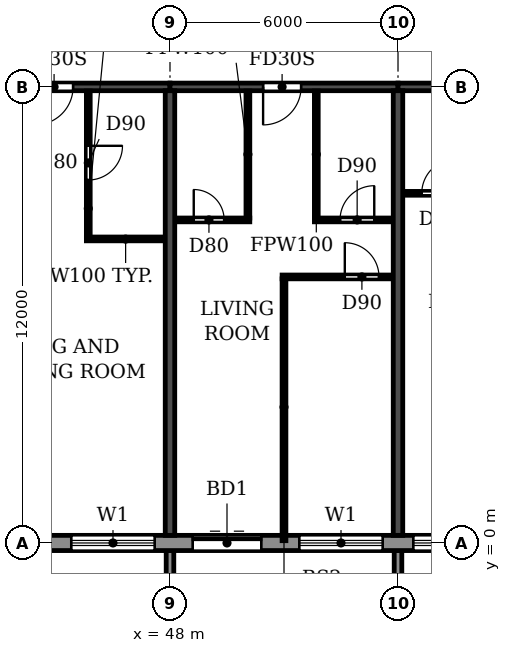
"""IFC4 building model, lengths in metres.
Left out: names, types, materials, properties, quantities, classifications, styles, units other than length and angle.
Written with IfcOpenShell. Run it as: python <this file> out.ifc"""

import sys

from ifc_helpers import new_model, si_unit, direction, frame, frame_2d, origin, place, context, subcontext, project, spatial, polyline, rectangle, outline, extrude, source, transform, mapped, element, fill, save


model = new_model("IFC4")
c1 = context("Model", 3, precision=1e-05, world=origin(), true_north=direction((0.0, 1.0)))
c2 = subcontext(c1, "Body", "Model", "MODEL_VIEW")
j1 = project(units=[si_unit("LENGTHUNIT", "METRE"), si_unit("PLANEANGLEUNIT", "RADIAN")], contexts=[c1])
p1 = place(None, origin())
s1 = spatial("IfcSite", under=j1, at=p1, CompositionType="ELEMENT")
p2 = place(p1, origin())
s2 = spatial("IfcBuilding", under=s1, at=p2, CompositionType="ELEMENT")
p3 = place(p2, frame((0.0, 0.0, 201.6)))
s3 = spatial("IfcBuildingStorey", under=s2, at=p3, CompositionType="ELEMENT", Elevation=201.6)
for number, where, z_axis, x_axis in (
    (1, (48.0, 0.2, 0.0), (0.0, 0.0, 1.0), (0.0, 1.0, 0.0)),
    (2, (54.0, 0.2, 0.0), (0.0, 0.0, 1.0), (0.0, 1.0, 0.0)),
):
    element("IfcWall", number, at=place(p3, frame(where, z_axis=z_axis, x_axis=x_axis)), inside=s3, PredefinedType="SHEAR", context=c2, shape_type="SweptSolid", body=[
        extrude(rectangle(XDim=11.7, YDim=0.25, at=frame_2d((5.85, 0.0))), origin(), (0.0, 0.0, 1.0), 3.08),
    ])
p4 = place(p3, frame((42.0, 12.0, 0.0), z_axis=(0.0, 0.0, 1.0), x_axis=(1.0, 0.0, 0.0)))
e3 = element("IfcWall", 3, at=p4, inside=s3, PredefinedType="SHEAR", context=c2, shape_type="SweptSolid", body=[
    extrude(rectangle(XDim=6.0, YDim=0.2, at=frame_2d((3.0, 0.0))), origin(), (0.0, 0.0, 1.0), 2.48),
])
p5 = place(p4, frame((2.45, 0.0, 0.0)))
e4 = element("IfcOpeningElement", 4, at=p5, cuts=e3, PredefinedType="OPENING", context=c2, shape_type="SweptSolid", body=[
    extrude(rectangle(XDim=1.0, YDim=2.1, at=frame_2d((0.5, 1.05))), frame((0.0, 0.11, 0.0), z_axis=(0.0, -1.0, 0.0), x_axis=(1.0, 0.0, 0.0)), (0.0, 0.0, 1.0), 0.22),
])
p6 = place(p3, frame((48.0, 12.0, 0.0), z_axis=(0.0, 0.0, 1.0), x_axis=(1.0, 0.0, 0.0)))
e5 = element("IfcWall", 5, at=p6, inside=s3, PredefinedType="SHEAR", context=c2, shape_type="SweptSolid", body=[
    extrude(rectangle(XDim=6.0, YDim=0.2, at=frame_2d((3.0, 0.0))), origin(), (0.0, 0.0, 1.0), 2.48),
])
p7 = place(p6, frame((2.45, 0.0, 0.0)))
e6 = element("IfcOpeningElement", 6, at=p7, cuts=e5, PredefinedType="OPENING", context=c2, shape_type="SweptSolid", body=[
    extrude(rectangle(XDim=1.0, YDim=2.1, at=frame_2d((0.5, 1.05))), frame((0.0, 0.11, 0.0), z_axis=(0.0, -1.0, 0.0), x_axis=(1.0, 0.0, 0.0)), (0.0, 0.0, 1.0), 0.22),
])
p8 = place(p3, frame((54.0, 12.0, 0.0), z_axis=(0.0, 0.0, 1.0), x_axis=(1.0, 0.0, 0.0)))
e7 = element("IfcWall", 7, at=p8, inside=s3, PredefinedType="SHEAR", context=c2, shape_type="SweptSolid", body=[
    extrude(rectangle(XDim=6.0, YDim=0.2, at=frame_2d((3.0, 0.0))), origin(), (0.0, 0.0, 1.0), 2.48),
])
p9 = place(p8, frame((2.55, 0.0, 0.0)))
e8 = element("IfcOpeningElement", 8, at=p9, cuts=e7, PredefinedType="OPENING", context=c2, shape_type="SweptSolid", body=[
    extrude(rectangle(XDim=1.0, YDim=2.1, at=frame_2d((0.5, 1.05))), frame((0.0, 0.11, 0.0), z_axis=(0.0, -1.0, 0.0), x_axis=(1.0, 0.0, 0.0)), (0.0, 0.0, 1.0), 0.22),
])
p10 = place(p3, frame((22.683, 0.0, 0.0), z_axis=(0.0, 0.0, 1.0), x_axis=(1.0, 0.0, 0.0)))
e9 = element("IfcWall", 9, at=p10, inside=s3, PredefinedType="STANDARD", context=c2, shape_type="SweptSolid", body=[
    extrude(rectangle(XDim=56.634, YDim=0.4, at=frame_2d((28.317, 0.0))), origin(), (0.0, 0.0, 1.0), 3.08),
])
p11 = place(p10, frame((1.917, 0.0, 0.0)))
e10 = element("IfcOpeningElement", 10, at=p11, cuts=e9, PredefinedType="OPENING", context=c2, shape_type="SweptSolid", body=[
    extrude(rectangle(XDim=1.8, YDim=2.4, at=frame_2d((0.9, 1.2))), frame((0.0, 0.21, 0.0), z_axis=(0.0, -1.0, 0.0), x_axis=(1.0, 0.0, 0.0)), (0.0, 0.0, 1.0), 0.42),
])
p12 = place(p10, frame((4.717, 0.0, 0.9)))
e11 = element("IfcOpeningElement", 11, at=p12, cuts=e9, PredefinedType="OPENING", context=c2, shape_type="SweptSolid", body=[
    extrude(rectangle(XDim=2.2, YDim=1.5, at=frame_2d((1.1, 0.75))), frame((0.0, 0.21, 0.0), z_axis=(0.0, -1.0, 0.0), x_axis=(1.0, 0.0, 0.0)), (0.0, 0.0, 1.0), 0.42),
])
p13 = place(p10, frame((7.717, 0.0, 0.9)))
e12 = element("IfcOpeningElement", 12, at=p13, cuts=e9, PredefinedType="OPENING", context=c2, shape_type="SweptSolid", body=[
    extrude(rectangle(XDim=2.2, YDim=1.5, at=frame_2d((1.1, 0.75))), frame((0.0, 0.21, 0.0), z_axis=(0.0, -1.0, 0.0), x_axis=(1.0, 0.0, 0.0)), (0.0, 0.0, 1.0), 0.42),
])
p14 = place(p10, frame((10.717, 0.0, 0.9)))
e13 = element("IfcOpeningElement", 13, at=p14, cuts=e9, PredefinedType="OPENING", context=c2, shape_type="SweptSolid", body=[
    extrude(rectangle(XDim=2.2, YDim=1.5, at=frame_2d((1.1, 0.75))), frame((0.0, 0.21, 0.0), z_axis=(0.0, -1.0, 0.0), x_axis=(1.0, 0.0, 0.0)), (0.0, 0.0, 1.0), 0.42),
])
p15 = place(p10, frame((13.917, 0.0, 0.0)))
e14 = element("IfcOpeningElement", 14, at=p15, cuts=e9, PredefinedType="OPENING", context=c2, shape_type="SweptSolid", body=[
    extrude(rectangle(XDim=1.8, YDim=2.4, at=frame_2d((0.9, 1.2))), frame((0.0, 0.21, 0.0), z_axis=(0.0, -1.0, 0.0), x_axis=(1.0, 0.0, 0.0)), (0.0, 0.0, 1.0), 0.42),
])
p16 = place(p10, frame((16.717, 0.0, 0.9)))
e15 = element("IfcOpeningElement", 15, at=p16, cuts=e9, PredefinedType="OPENING", context=c2, shape_type="SweptSolid", body=[
    extrude(rectangle(XDim=2.2, YDim=1.5, at=frame_2d((1.1, 0.75))), frame((0.0, 0.21, 0.0), z_axis=(0.0, -1.0, 0.0), x_axis=(1.0, 0.0, 0.0)), (0.0, 0.0, 1.0), 0.42),
])
p17 = place(p10, frame((19.717, 0.0, 0.9)))
e16 = element("IfcOpeningElement", 16, at=p17, cuts=e9, PredefinedType="OPENING", context=c2, shape_type="SweptSolid", body=[
    extrude(rectangle(XDim=2.2, YDim=1.5, at=frame_2d((1.1, 0.75))), frame((0.0, 0.21, 0.0), z_axis=(0.0, -1.0, 0.0), x_axis=(1.0, 0.0, 0.0)), (0.0, 0.0, 1.0), 0.42),
])
p18 = place(p10, frame((22.717, 0.0, 0.9)))
e17 = element("IfcOpeningElement", 17, at=p18, cuts=e9, PredefinedType="OPENING", context=c2, shape_type="SweptSolid", body=[
    extrude(rectangle(XDim=2.2, YDim=1.5, at=frame_2d((1.1, 0.75))), frame((0.0, 0.21, 0.0), z_axis=(0.0, -1.0, 0.0), x_axis=(1.0, 0.0, 0.0)), (0.0, 0.0, 1.0), 0.42),
])
p19 = place(p10, frame((25.917, 0.0, 0.0)))
e18 = element("IfcOpeningElement", 18, at=p19, cuts=e9, PredefinedType="OPENING", context=c2, shape_type="SweptSolid", body=[
    extrude(rectangle(XDim=1.8, YDim=2.4, at=frame_2d((0.9, 1.2))), frame((0.0, 0.21, 0.0), z_axis=(0.0, -1.0, 0.0), x_axis=(1.0, 0.0, 0.0)), (0.0, 0.0, 1.0), 0.42),
])
p20 = place(p10, frame((28.717, 0.0, 0.9)))
e19 = element("IfcOpeningElement", 19, at=p20, cuts=e9, PredefinedType="OPENING", context=c2, shape_type="SweptSolid", body=[
    extrude(rectangle(XDim=2.2, YDim=1.5, at=frame_2d((1.1, 0.75))), frame((0.0, 0.21, 0.0), z_axis=(0.0, -1.0, 0.0), x_axis=(1.0, 0.0, 0.0)), (0.0, 0.0, 1.0), 0.42),
])
p21 = place(p10, frame((31.717, 0.0, 0.9)))
e20 = element("IfcOpeningElement", 20, at=p21, cuts=e9, PredefinedType="OPENING", context=c2, shape_type="SweptSolid", body=[
    extrude(rectangle(XDim=2.2, YDim=1.5, at=frame_2d((1.1, 0.75))), frame((0.0, 0.21, 0.0), z_axis=(0.0, -1.0, 0.0), x_axis=(1.0, 0.0, 0.0)), (0.0, 0.0, 1.0), 0.42),
])
p22 = place(p10, frame((34.717, 0.0, 0.9)))
e21 = element("IfcOpeningElement", 21, at=p22, cuts=e9, PredefinedType="OPENING", context=c2, shape_type="SweptSolid", body=[
    extrude(rectangle(XDim=2.2, YDim=1.5, at=frame_2d((1.1, 0.75))), frame((0.0, 0.21, 0.0), z_axis=(0.0, -1.0, 0.0), x_axis=(1.0, 0.0, 0.0)), (0.0, 0.0, 1.0), 0.42),
])
p23 = place(p10, frame((37.717, 0.0, 0.9)))
e22 = element("IfcOpeningElement", 22, at=p23, cuts=e9, PredefinedType="OPENING", context=c2, shape_type="SweptSolid", body=[
    extrude(rectangle(XDim=2.2, YDim=1.5, at=frame_2d((1.1, 0.75))), frame((0.0, 0.21, 0.0), z_axis=(0.0, -1.0, 0.0), x_axis=(1.0, 0.0, 0.0)), (0.0, 0.0, 1.0), 0.42),
])
p24 = place(p10, frame((40.717, 0.0, 0.9)))
e23 = element("IfcOpeningElement", 23, at=p24, cuts=e9, PredefinedType="OPENING", context=c2, shape_type="SweptSolid", body=[
    extrude(rectangle(XDim=2.2, YDim=1.5, at=frame_2d((1.1, 0.75))), frame((0.0, 0.21, 0.0), z_axis=(0.0, -1.0, 0.0), x_axis=(1.0, 0.0, 0.0)), (0.0, 0.0, 1.0), 0.42),
])
p25 = place(p10, frame((43.717, 0.0, 0.9)))
e24 = element("IfcOpeningElement", 24, at=p25, cuts=e9, PredefinedType="OPENING", context=c2, shape_type="SweptSolid", body=[
    extrude(rectangle(XDim=2.2, YDim=1.5, at=frame_2d((1.1, 0.75))), frame((0.0, 0.21, 0.0), z_axis=(0.0, -1.0, 0.0), x_axis=(1.0, 0.0, 0.0)), (0.0, 0.0, 1.0), 0.42),
])
p26 = place(p10, frame((46.717, 0.0, 0.9)))
e25 = element("IfcOpeningElement", 25, at=p26, cuts=e9, PredefinedType="OPENING", context=c2, shape_type="SweptSolid", body=[
    extrude(rectangle(XDim=2.2, YDim=1.5, at=frame_2d((1.1, 0.75))), frame((0.0, 0.21, 0.0), z_axis=(0.0, -1.0, 0.0), x_axis=(1.0, 0.0, 0.0)), (0.0, 0.0, 1.0), 0.42),
])
p27 = place(p10, frame((49.717, 0.0, 0.9)))
e26 = element("IfcOpeningElement", 26, at=p27, cuts=e9, PredefinedType="OPENING", context=c2, shape_type="SweptSolid", body=[
    extrude(rectangle(XDim=2.2, YDim=1.5, at=frame_2d((1.1, 0.75))), frame((0.0, 0.21, 0.0), z_axis=(0.0, -1.0, 0.0), x_axis=(1.0, 0.0, 0.0)), (0.0, 0.0, 1.0), 0.42),
])
p28 = place(p10, frame((52.917, 0.0, 0.0)))
e27 = element("IfcOpeningElement", 27, at=p28, cuts=e9, PredefinedType="OPENING", context=c2, shape_type="SweptSolid", body=[
    extrude(rectangle(XDim=1.8, YDim=2.4, at=frame_2d((0.9, 1.2))), frame((0.0, 0.21, 0.0), z_axis=(0.0, -1.0, 0.0), x_axis=(1.0, 0.0, 0.0)), (0.0, 0.0, 1.0), 0.42),
])
m1 = source(origin(), c2, "Body", "SweptSolid", [
    extrude(outline(polyline([(0.0, 0.0), (0.2, 0.0), (0.2, 1.65), (0.0, 1.65), (0.0, 0.0)])), origin(), (0.0, 0.0, 1.0), 3.1),
])
for number, where in (
    (28, (47.9, -1.85, 0.0)),
    (29, (53.9, -1.85, 0.0)),
):
    element("IfcWall", number, at=place(p3, frame(where)), inside=s3, PredefinedType="STANDARD", context=c2, shape_type="MappedRepresentation", body=[
        mapped(m1, transform((0.0, 0.0, 0.0))),
    ])
p29 = place(p3, frame((50.95, 7.0, 0.0), z_axis=(0.0, 0.0, 1.0), x_axis=(1.0, 0.0, 0.0)))
e30 = element("IfcWall", 30, at=p29, inside=s3, PredefinedType="PARTITIONING", context=c2, shape_type="SweptSolid", body=[
    extrude(rectangle(XDim=2.915, YDim=0.1, at=frame_2d((1.458, 0.0))), origin(), (0.0, 0.0, 1.0), 3.08),
])
p30 = place(p29, frame((1.65, 0.0, 0.0)))
e31 = element("IfcOpeningElement", 31, at=p30, cuts=e30, PredefinedType="OPENING", context=c2, shape_type="SweptSolid", body=[
    extrude(rectangle(XDim=0.9, YDim=2.1, at=frame_2d((0.45, 1.05))), frame((0.0, 0.06, 0.0), z_axis=(0.0, -1.0, 0.0), x_axis=(1.0, 0.0, 0.0)), (0.0, 0.0, 1.0), 0.12),
])
p31 = place(p3, frame((45.8, 8.0, 0.0), z_axis=(0.0, 0.0, 1.0), x_axis=(1.0, 0.0, 0.0)))
e32 = element("IfcWall", 32, at=p31, inside=s3, PredefinedType="PARTITIONING", context=c2, shape_type="SweptSolid", body=[
    extrude(rectangle(XDim=2.065, YDim=0.1, at=frame_2d((1.032, 0.0))), origin(), (0.0, 0.0, 1.0), 3.08),
])
p32 = place(p3, frame((48.135, 8.5, 0.0), z_axis=(0.0, 0.0, 1.0), x_axis=(1.0, 0.0, 0.0)))
e33 = element("IfcWall", 33, at=p32, inside=s3, PredefinedType="PARTITIONING", context=c2, shape_type="SweptSolid", body=[
    extrude(rectangle(XDim=1.965, YDim=0.1, at=frame_2d((0.982, 0.0))), origin(), (0.0, 0.0, 1.0), 3.08),
])
p33 = place(p32, frame((0.49, 0.0, 0.0)))
e34 = element("IfcOpeningElement", 34, at=p33, cuts=e33, PredefinedType="OPENING", context=c2, shape_type="SweptSolid", body=[
    extrude(rectangle(XDim=0.8, YDim=2.1, at=frame_2d((0.4, 1.05))), frame((0.0, 0.06, 0.0), z_axis=(0.0, -1.0, 0.0), x_axis=(1.0, 0.0, 0.0)), (0.0, 0.0, 1.0), 0.12),
])
p34 = place(p3, frame((51.8, 8.5, 0.0), z_axis=(0.0, 0.0, 1.0), x_axis=(1.0, 0.0, 0.0)))
e35 = element("IfcWall", 35, at=p34, inside=s3, PredefinedType="PARTITIONING", context=c2, shape_type="SweptSolid", body=[
    extrude(rectangle(XDim=2.065, YDim=0.1, at=frame_2d((1.032, 0.0))), origin(), (0.0, 0.0, 1.0), 3.08),
])
p35 = place(p34, frame((0.675, 0.0, 0.0)))
e36 = element("IfcOpeningElement", 36, at=p35, cuts=e35, PredefinedType="OPENING", context=c2, shape_type="SweptSolid", body=[
    extrude(rectangle(XDim=0.9, YDim=2.1, at=frame_2d((0.45, 1.05))), frame((0.0, 0.06, 0.0), z_axis=(0.0, -1.0, 0.0), x_axis=(1.0, 0.0, 0.0)), (0.0, 0.0, 1.0), 0.12),
])
p36 = place(p3, frame((54.135, 9.2, 0.0), z_axis=(0.0, 0.0, 1.0), x_axis=(1.0, 0.0, 0.0)))
e37 = element("IfcWall", 37, at=p36, inside=s3, PredefinedType="PARTITIONING", context=c2, shape_type="SweptSolid", body=[
    extrude(rectangle(XDim=2.065, YDim=0.1, at=frame_2d((1.032, 0.0))), origin(), (0.0, 0.0, 1.0), 3.08),
])
p37 = place(p36, frame((0.49, 0.0, 0.0)))
e38 = element("IfcOpeningElement", 38, at=p37, cuts=e37, PredefinedType="OPENING", context=c2, shape_type="SweptSolid", body=[
    extrude(rectangle(XDim=0.9, YDim=2.1, at=frame_2d((0.45, 1.05))), frame((0.0, 0.06, 0.0), z_axis=(0.0, -1.0, 0.0), x_axis=(1.0, 0.0, 0.0)), (0.0, 0.0, 1.0), 0.12),
])
p38 = place(p3, frame((45.85, 8.05, 0.0), z_axis=(0.0, 0.0, 1.0), x_axis=(0.0, 1.0, 0.0)))
e39 = element("IfcWall", 39, at=p38, inside=s3, PredefinedType="PARTITIONING", context=c2, shape_type="SweptSolid", body=[
    extrude(rectangle(XDim=3.84, YDim=0.1, at=frame_2d((1.92, 0.0))), origin(), (0.0, 0.0, 1.0), 3.08),
])
p39 = place(p38, frame((1.5, 0.0, 0.0)))
e40 = element("IfcOpeningElement", 40, at=p39, cuts=e39, PredefinedType="OPENING", context=c2, shape_type="SweptSolid", body=[
    extrude(rectangle(XDim=0.9, YDim=2.1, at=frame_2d((0.45, 1.05))), frame((0.0, 0.06, 0.0), z_axis=(0.0, -1.0, 0.0), x_axis=(1.0, 0.0, 0.0)), (0.0, 0.0, 1.0), 0.12),
])
p40 = place(p3, frame((50.05, 8.55, 0.0), z_axis=(0.0, 0.0, 1.0), x_axis=(0.0, 1.0, 0.0)))
e41 = element("IfcWall", 41, at=p40, inside=s3, PredefinedType="PARTITIONING", context=c2, shape_type="SweptSolid", body=[
    extrude(rectangle(XDim=3.34, YDim=0.1, at=frame_2d((1.67, 0.0))), origin(), (0.0, 0.0, 1.0), 3.08),
])
p41 = place(p3, frame((51.0, 0.06, 0.0), z_axis=(0.0, 0.0, 1.0), x_axis=(0.0, 1.0, 0.0)))
e42 = element("IfcWall", 42, at=p41, inside=s3, PredefinedType="PARTITIONING", context=c2, shape_type="SweptSolid", body=[
    extrude(rectangle(XDim=6.89, YDim=0.1, at=frame_2d((3.445, 0.0))), origin(), (0.0, 0.0, 1.0), 3.08),
])
p42 = place(p3, frame((51.85, 8.55, 0.0), z_axis=(0.0, 0.0, 1.0), x_axis=(0.0, 1.0, 0.0)))
e43 = element("IfcWall", 43, at=p42, inside=s3, PredefinedType="PARTITIONING", context=c2, shape_type="SweptSolid", body=[
    extrude(rectangle(XDim=3.34, YDim=0.1, at=frame_2d((1.67, 0.0))), origin(), (0.0, 0.0, 1.0), 3.08),
])
p43 = place(p18, origin())
e44 = element("IfcWindow", 44, at=p43, inside=s3, PartitioningType="DOUBLE_PANEL_HORIZONTAL", PredefinedType="WINDOW", context=c2, shape_type="SweptSolid", body=[
    extrude(rectangle(XDim=2.2, YDim=1.5, at=frame_2d((1.1, 0.75))), frame((0.0, 0.03, 0.0), z_axis=(0.0, -1.0, 0.0), x_axis=(1.0, 0.0, 0.0)), (0.0, 0.0, 1.0), 0.06),
])
fill(e17, e44)
p44 = place(p19, origin())
e45 = element("IfcDoor", 45, at=p44, inside=s3, OperationType="DOUBLE_DOOR_SLIDING", PredefinedType="DOOR", context=c2, shape_type="SweptSolid", body=[
    extrude(rectangle(XDim=1.8, YDim=2.4, at=frame_2d((0.9, 1.2))), frame((0.0, 0.025, 0.0), z_axis=(0.0, -1.0, 0.0), x_axis=(1.0, 0.0, 0.0)), (0.0, 0.0, 1.0), 0.05),
])
fill(e18, e45)
p45 = place(p20, origin())
e46 = element("IfcWindow", 46, at=p45, inside=s3, PartitioningType="DOUBLE_PANEL_HORIZONTAL", PredefinedType="WINDOW", context=c2, shape_type="SweptSolid", body=[
    extrude(rectangle(XDim=2.2, YDim=1.5, at=frame_2d((1.1, 0.75))), frame((0.0, 0.03, 0.0), z_axis=(0.0, -1.0, 0.0), x_axis=(1.0, 0.0, 0.0)), (0.0, 0.0, 1.0), 0.06),
])
fill(e19, e46)
p46 = place(p21, origin())
e47 = element("IfcWindow", 47, at=p46, inside=s3, PartitioningType="DOUBLE_PANEL_HORIZONTAL", PredefinedType="WINDOW", context=c2, shape_type="SweptSolid", body=[
    extrude(rectangle(XDim=2.2, YDim=1.5, at=frame_2d((1.1, 0.75))), frame((0.0, 0.03, 0.0), z_axis=(0.0, -1.0, 0.0), x_axis=(1.0, 0.0, 0.0)), (0.0, 0.0, 1.0), 0.06),
])
fill(e20, e47)
p47 = place(p5, frame((1.0, 0.0, 0.0), z_axis=(0.0, 0.0, 1.0), x_axis=(-1.0, 0.0, 0.0)))
e48 = element("IfcDoor", 48, at=p47, inside=s3, OperationType="SINGLE_SWING_RIGHT", PredefinedType="DOOR", context=c2, shape_type="SweptSolid", body=[
    extrude(rectangle(XDim=1.0, YDim=2.1, at=frame_2d((0.5, 1.05))), frame((0.0, 0.025, 0.0), z_axis=(0.0, -1.0, 0.0), x_axis=(1.0, 0.0, 0.0)), (0.0, 0.0, 1.0), 0.05),
])
fill(e4, e48)
p48 = place(p39, frame((0.9, 0.0, 0.0), z_axis=(0.0, 0.0, 1.0), x_axis=(-1.0, 0.0, 0.0)))
e49 = element("IfcDoor", 49, at=p48, inside=s3, OperationType="SINGLE_SWING_LEFT", PredefinedType="DOOR", context=c2, shape_type="SweptSolid", body=[
    extrude(rectangle(XDim=0.9, YDim=2.1, at=frame_2d((0.45, 1.05))), frame((0.0, 0.025, 0.0), z_axis=(0.0, -1.0, 0.0), x_axis=(1.0, 0.0, 0.0)), (0.0, 0.0, 1.0), 0.05),
])
fill(e40, e49)
p49 = place(p33, origin())
e50 = element("IfcDoor", 50, at=p49, inside=s3, OperationType="SINGLE_SWING_LEFT", PredefinedType="DOOR", context=c2, shape_type="SweptSolid", body=[
    extrude(rectangle(XDim=0.8, YDim=2.1, at=frame_2d((0.4, 1.05))), frame((0.0, 0.025, 0.0), z_axis=(0.0, -1.0, 0.0), x_axis=(1.0, 0.0, 0.0)), (0.0, 0.0, 1.0), 0.05),
])
fill(e34, e50)
p50 = place(p7, frame((1.0, 0.0, 0.0), z_axis=(0.0, 0.0, 1.0), x_axis=(-1.0, 0.0, 0.0)))
e51 = element("IfcDoor", 51, at=p50, inside=s3, OperationType="SINGLE_SWING_RIGHT", PredefinedType="DOOR", context=c2, shape_type="SweptSolid", body=[
    extrude(rectangle(XDim=1.0, YDim=2.1, at=frame_2d((0.5, 1.05))), frame((0.0, 0.025, 0.0), z_axis=(0.0, -1.0, 0.0), x_axis=(1.0, 0.0, 0.0)), (0.0, 0.0, 1.0), 0.05),
])
fill(e6, e51)
p51 = place(p35, origin())
e52 = element("IfcDoor", 52, at=p51, inside=s3, OperationType="SINGLE_SWING_RIGHT", PredefinedType="DOOR", context=c2, shape_type="SweptSolid", body=[
    extrude(rectangle(XDim=0.9, YDim=2.1, at=frame_2d((0.45, 1.05))), frame((0.0, 0.025, 0.0), z_axis=(0.0, -1.0, 0.0), x_axis=(1.0, 0.0, 0.0)), (0.0, 0.0, 1.0), 0.05),
])
fill(e36, e52)
p52 = place(p30, origin())
e53 = element("IfcDoor", 53, at=p52, inside=s3, OperationType="SINGLE_SWING_LEFT", PredefinedType="DOOR", context=c2, shape_type="SweptSolid", body=[
    extrude(rectangle(XDim=0.9, YDim=2.1, at=frame_2d((0.45, 1.05))), frame((0.0, 0.025, 0.0), z_axis=(0.0, -1.0, 0.0), x_axis=(1.0, 0.0, 0.0)), (0.0, 0.0, 1.0), 0.05),
])
fill(e31, e53)
p53 = place(p37, origin())
e54 = element("IfcDoor", 54, at=p53, inside=s3, OperationType="SINGLE_SWING_RIGHT", PredefinedType="DOOR", context=c2, shape_type="SweptSolid", body=[
    extrude(rectangle(XDim=0.9, YDim=2.1, at=frame_2d((0.45, 1.05))), frame((0.0, 0.025, 0.0), z_axis=(0.0, -1.0, 0.0), x_axis=(1.0, 0.0, 0.0)), (0.0, 0.0, 1.0), 0.05),
])
fill(e38, e54)
save(model, sys.argv[1])
